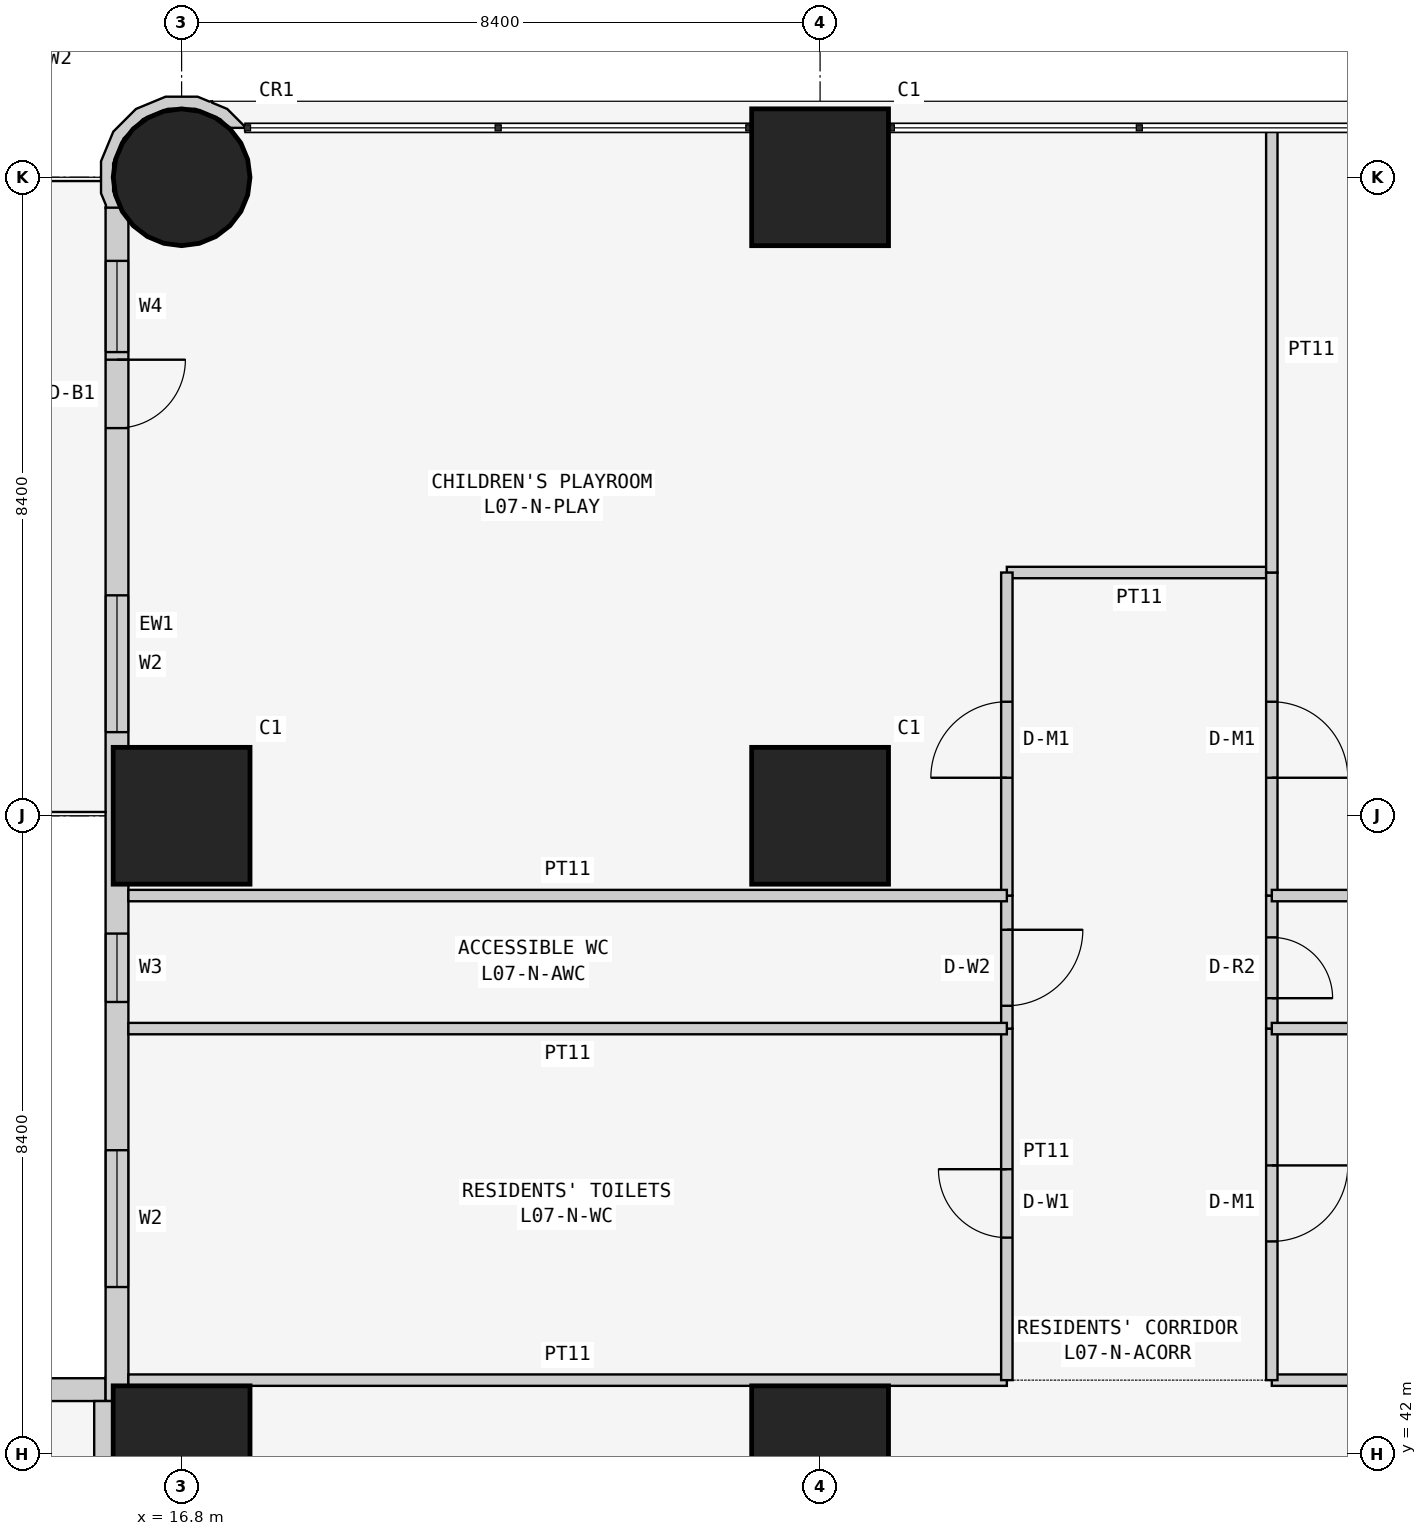
"""IFC4 building model, lengths in metres.
Left out: names, types, materials, properties, quantities, classifications, styles, units other than length and angle.
Written with IfcOpenShell. Run it as: python <this file> out.ifc"""

import sys

from ifc_helpers import new_model, si_unit, direction, frame, frame_2d, origin, origin_2d, place, context, subcontext, project, spatial, polyline, rectangle, circle, outline, extrude, element, fill, save


model = new_model("IFC4")
c1 = context("Model", 3, precision=1e-05, world=origin(), true_north=direction((0.0, 1.0)))
c2 = subcontext(c1, "Body", "Model", "MODEL_VIEW")
j1 = project(units=[si_unit("LENGTHUNIT", "METRE"), si_unit("PLANEANGLEUNIT", "RADIAN")], contexts=[c1])
p1 = place(None, origin())
s1 = spatial("IfcSite", under=j1, at=p1, CompositionType="ELEMENT")
p2 = place(p1, origin())
s2 = spatial("IfcBuilding", under=s1, at=p2, CompositionType="ELEMENT")
p3 = place(p2, frame((0.0, 0.0, 34.5)))
s3 = spatial("IfcBuildingStorey", under=s2, at=p3, CompositionType="ELEMENT", Elevation=34.5)
for number, where, z_axis, x_axis in (
    (1, (16.8, 42.0, 0.0), (0.0, 0.0, 1.0), (1.0, 0.0, 0.0)),
    (2, (16.8, 50.4, 0.0), (0.0, 0.0, 1.0), (1.0, 0.0, 0.0)),
):
    element("IfcColumn", number, at=place(p3, frame(where, z_axis=z_axis, x_axis=x_axis)), inside=s3, PredefinedType="COLUMN", context=c2, shape_type="SweptSolid", body=[
        extrude(rectangle(XDim=1.8, YDim=1.8, at=origin_2d()), origin(), (0.0, 0.0, 1.0), 3.6),
    ])
p4 = place(p3, frame((16.8, 58.8, 0.0), z_axis=(0.0, 0.0, 1.0), x_axis=(1.0, 0.0, 0.0)))
e3 = element("IfcColumn", 3, at=p4, inside=s3, PredefinedType="COLUMN", context=c2, shape_type="SweptSolid", body=[
    extrude(circle(Radius=0.9, at=origin_2d()), origin(), (0.0, 0.0, 1.0), 3.6),
])
for number, where, z_axis, x_axis in (
    (4, (25.2, 42.0, 0.0), (0.0, 0.0, 1.0), (1.0, 0.0, 0.0)),
    (5, (25.2, 50.4, 0.0), (0.0, 0.0, 1.0), (1.0, 0.0, 0.0)),
    (6, (25.2, 58.8, 0.0), (0.0, 0.0, 1.0), (1.0, 0.0, 0.0)),
):
    element("IfcColumn", number, at=place(p3, frame(where, z_axis=z_axis, x_axis=x_axis)), inside=s3, PredefinedType="COLUMN", context=c2, shape_type="SweptSolid", body=[
        extrude(rectangle(XDim=1.8, YDim=1.8, at=origin_2d()), origin(), (0.0, 0.0, 1.0), 3.6),
    ])
p5 = place(p3, frame((15.8, 42.85, 0.0), z_axis=(0.0, 0.0, 1.0), x_axis=(-1.0, 0.0, 0.0)))
e7 = element("IfcWall", 7, at=p5, inside=s3, PredefinedType="SOLIDWALL", context=c2, shape_type="SweptSolid", body=[
    extrude(rectangle(XDim=15.4, YDim=0.3, at=frame_2d((7.7, 0.0))), origin(), (0.0, 0.0, 1.0), 3.45),
])
p6 = place(p5, frame((1.2, 0.0, 0.9)))
e8 = element("IfcOpeningElement", 8, at=p6, cuts=e7, PredefinedType="OPENING", context=c2, shape_type="SweptSolid", body=[
    extrude(rectangle(XDim=1.8, YDim=1.5, at=frame_2d((0.9, 0.75))), frame((0.0, 0.16, 0.0), z_axis=(0.0, -1.0, 0.0), x_axis=(1.0, 0.0, 0.0)), (0.0, 0.0, 1.0), 0.32),
])
p7 = place(p5, frame((4.95, 0.0, 1.5)))
e9 = element("IfcOpeningElement", 9, at=p7, cuts=e7, PredefinedType="OPENING", context=c2, shape_type="SweptSolid", body=[
    extrude(rectangle(XDim=0.9, YDim=0.7, at=frame_2d((0.45, 0.35))), frame((0.0, 0.16, 0.0), z_axis=(0.0, -1.0, 0.0), x_axis=(1.0, 0.0, 0.0)), (0.0, 0.0, 1.0), 0.32),
])
p8 = place(p5, frame((8.5, 0.0, 0.9)))
e10 = element("IfcOpeningElement", 10, at=p8, cuts=e7, PredefinedType="OPENING", context=c2, shape_type="SweptSolid", body=[
    extrude(rectangle(XDim=1.8, YDim=1.5, at=frame_2d((0.9, 0.75))), frame((0.0, 0.16, 0.0), z_axis=(0.0, -1.0, 0.0), x_axis=(1.0, 0.0, 0.0)), (0.0, 0.0, 1.0), 0.32),
])
p9 = place(p5, frame((12.5, 0.0, 0.0)))
e11 = element("IfcOpeningElement", 11, at=p9, cuts=e7, PredefinedType="OPENING", context=c2, shape_type="SweptSolid", body=[
    extrude(rectangle(XDim=0.9, YDim=2.4, at=frame_2d((0.45, 1.2))), frame((0.0, 0.16, 0.0), z_axis=(0.0, -1.0, 0.0), x_axis=(1.0, 0.0, 0.0)), (0.0, 0.0, 1.0), 0.32),
])
p10 = place(p5, frame((13.5, 0.0, 0.9)))
e12 = element("IfcOpeningElement", 12, at=p10, cuts=e7, PredefinedType="OPENING", context=c2, shape_type="SweptSolid", body=[
    extrude(rectangle(XDim=1.2, YDim=1.5, at=frame_2d((0.6, 0.75))), frame((0.0, 0.16, 0.0), z_axis=(0.0, -1.0, 0.0), x_axis=(1.0, 0.0, 0.0)), (0.0, 0.0, 1.0), 0.32),
])
p11 = place(p3, frame((15.95, 58.4, 0.0), z_axis=(0.0, 0.0, 1.0), x_axis=(0.0, -1.0, 0.0)))
e13 = element("IfcWall", 13, at=p11, inside=s3, PredefinedType="SOLIDWALL", context=c2, shape_type="SweptSolid", body=[
    extrude(rectangle(XDim=15.7, YDim=0.3, at=frame_2d((7.85, 0.0))), origin(), (0.0, 0.0, 1.0), 3.45),
])
p12 = place(p11, frame((12.4, 0.0, 0.9)))
e14 = element("IfcOpeningElement", 14, at=p12, cuts=e13, PredefinedType="OPENING", context=c2, shape_type="SweptSolid", body=[
    extrude(rectangle(XDim=1.8, YDim=1.5, at=frame_2d((0.9, 0.75))), frame((0.0, 0.16, 0.0), z_axis=(0.0, -1.0, 0.0), x_axis=(1.0, 0.0, 0.0)), (0.0, 0.0, 1.0), 0.32),
])
p13 = place(p11, frame((9.55, 0.0, 1.5)))
e15 = element("IfcOpeningElement", 15, at=p13, cuts=e13, PredefinedType="OPENING", context=c2, shape_type="SweptSolid", body=[
    extrude(rectangle(XDim=0.9, YDim=0.7, at=frame_2d((0.45, 0.35))), frame((0.0, 0.16, 0.0), z_axis=(0.0, -1.0, 0.0), x_axis=(1.0, 0.0, 0.0)), (0.0, 0.0, 1.0), 0.32),
])
p14 = place(p11, frame((5.1, 0.0, 0.9)))
e16 = element("IfcOpeningElement", 16, at=p14, cuts=e13, PredefinedType="OPENING", context=c2, shape_type="SweptSolid", body=[
    extrude(rectangle(XDim=1.8, YDim=1.5, at=frame_2d((0.9, 0.75))), frame((0.0, 0.16, 0.0), z_axis=(0.0, -1.0, 0.0), x_axis=(1.0, 0.0, 0.0)), (0.0, 0.0, 1.0), 0.32),
])
p15 = place(p11, frame((2.0, 0.0, 0.0)))
e17 = element("IfcOpeningElement", 17, at=p15, cuts=e13, PredefinedType="OPENING", context=c2, shape_type="SweptSolid", body=[
    extrude(rectangle(XDim=0.9, YDim=2.4, at=frame_2d((0.45, 1.2))), frame((0.0, 0.16, 0.0), z_axis=(0.0, -1.0, 0.0), x_axis=(1.0, 0.0, 0.0)), (0.0, 0.0, 1.0), 0.32),
])
p16 = place(p11, frame((0.7, 0.0, 0.9)))
e18 = element("IfcOpeningElement", 18, at=p16, cuts=e13, PredefinedType="OPENING", context=c2, shape_type="SweptSolid", body=[
    extrude(rectangle(XDim=1.2, YDim=1.5, at=frame_2d((0.6, 0.75))), frame((0.0, 0.16, 0.0), z_axis=(0.0, -1.0, 0.0), x_axis=(1.0, 0.0, 0.0)), (0.0, 0.0, 1.0), 0.32),
])
p17 = place(p3, frame((17.567, 59.411, 0.0), z_axis=(0.0, 0.0, 1.0), x_axis=(-0.377204953059, 0.926129809145, 0.0)))
e19 = element("IfcWall", 19, at=p17, inside=s3, PredefinedType="SOLIDWALL", context=c2, shape_type="SweptSolid", body=[
    extrude(outline(polyline([(-0.27, 2.017), (-0.37, 1.841), (-0.102, 1.842), (0.23, 1.707), (0.484, 1.455), (0.624, 1.125), (0.626, 0.766), (0.491, 0.434), (0.239, 0.18), (0.09, 0.117), (0.011, -0.078), (0.024, -0.083), (0.329, 0.045), (0.48, 0.198), (0.499, 0.193), (0.508, 0.225), (0.626, 0.345), (0.785, 0.736), (0.782, 1.157), (0.619, 1.546), (0.319, 1.842), (-0.072, 2.002), (-0.24, 2.0), (-0.27, 2.017)])), origin(), (0.0, 0.0, 1.0), 3.45),
])
for number, where, z_axis, x_axis in (
    (20, (16.1, 42.975, 0.0), (0.0, 0.0, 1.0), (1.0, 0.0, 0.0)),
    (21, (31.143, 42.975, 0.0), (0.0, 0.0, 1.0), (1.0, 0.0, 0.0)),
):
    element("IfcWall", number, at=place(p3, frame(where, z_axis=z_axis, x_axis=x_axis)), inside=s3, PredefinedType="PARTITIONING", context=c2, shape_type="SweptSolid", body=[
        extrude(rectangle(XDim=11.557, YDim=0.15, at=frame_2d((5.778, 0.0))), origin(), (0.0, 0.0, 1.0), 3.45),
    ])
p18 = place(p3, frame((15.775, 36.229, 0.0), z_axis=(0.0, 0.0, 1.0), x_axis=(0.0, 1.0, 0.0)))
e22 = element("IfcWall", 22, at=p18, inside=s3, PredefinedType="PARTITIONING", context=c2, shape_type="SweptSolid", body=[
    extrude(rectangle(XDim=6.471, YDim=0.25, at=frame_2d((3.235, 0.0))), origin(), (0.0, 0.0, 1.0), 3.45),
])
p19 = place(p3, frame((27.657, 47.6, 0.0), z_axis=(0.0, 0.0, 1.0), x_axis=(0.0, -1.0, 0.0)))
e23 = element("IfcWall", 23, at=p19, inside=s3, PredefinedType="PARTITIONING", context=c2, shape_type="SweptSolid", body=[
    extrude(rectangle(XDim=4.625, YDim=0.15, at=frame_2d((2.312, 0.0))), origin(), (0.0, 0.0, 1.0), 3.45),
])
p20 = place(p19, frame((1.85, 0.0, 0.0)))
e24 = element("IfcOpeningElement", 24, at=p20, cuts=e23, PredefinedType="OPENING", context=c2, shape_type="SweptSolid", body=[
    extrude(rectangle(XDim=0.9, YDim=2.1, at=frame_2d((0.45, 1.05))), frame((0.0, 0.085, 0.0), z_axis=(0.0, -1.0, 0.0), x_axis=(1.0, 0.0, 0.0)), (0.0, 0.0, 1.0), 0.17),
])
p21 = place(p3, frame((27.657, 49.35, 0.0), z_axis=(0.0, 0.0, 1.0), x_axis=(0.0, -1.0, 0.0)))
e25 = element("IfcWall", 25, at=p21, inside=s3, PredefinedType="PARTITIONING", context=c2, shape_type="SweptSolid", body=[
    extrude(rectangle(XDim=1.75, YDim=0.15, at=frame_2d((0.875, 0.0))), origin(), (0.0, 0.0, 1.0), 3.45),
])
p22 = place(p21, frame((0.45, 0.0, 0.0)))
e26 = element("IfcOpeningElement", 26, at=p22, cuts=e25, PredefinedType="OPENING", context=c2, shape_type="SweptSolid", body=[
    extrude(rectangle(XDim=1.0, YDim=2.1, at=frame_2d((0.5, 1.05))), frame((0.0, 0.085, 0.0), z_axis=(0.0, -1.0, 0.0), x_axis=(1.0, 0.0, 0.0)), (0.0, 0.0, 1.0), 0.17),
])
p23 = place(p3, frame((31.143, 53.6, 0.0), z_axis=(0.0, 0.0, 1.0), x_axis=(-1.0, 0.0, 0.0)))
e27 = element("IfcWall", 27, at=p23, inside=s3, PredefinedType="PARTITIONING", context=c2, shape_type="SweptSolid", body=[
    extrude(rectangle(XDim=3.486, YDim=0.15, at=frame_2d((1.743, 0.0))), origin(), (0.0, 0.0, 1.0), 3.45),
])
p24 = place(p3, frame((27.657, 53.6, 0.0), z_axis=(0.0, 0.0, 1.0), x_axis=(0.0, -1.0, 0.0)))
e28 = element("IfcWall", 28, at=p24, inside=s3, PredefinedType="PARTITIONING", context=c2, shape_type="SweptSolid", body=[
    extrude(rectangle(XDim=4.25, YDim=0.15, at=frame_2d((2.125, 0.0))), origin(), (0.0, 0.0, 1.0), 3.45),
])
p25 = place(p24, frame((1.7, 0.0, 0.0)))
e29 = element("IfcOpeningElement", 29, at=p25, cuts=e28, PredefinedType="OPENING", context=c2, shape_type="SweptSolid", body=[
    extrude(rectangle(XDim=1.0, YDim=2.1, at=frame_2d((0.5, 1.05))), frame((0.0, 0.085, 0.0), z_axis=(0.0, -1.0, 0.0), x_axis=(1.0, 0.0, 0.0)), (0.0, 0.0, 1.0), 0.17),
])
p26 = place(p3, frame((31.143, 42.975, 0.0), z_axis=(0.0, 0.0, 1.0), x_axis=(0.0, 1.0, 0.0)))
e30 = element("IfcWall", 30, at=p26, inside=s3, PredefinedType="PARTITIONING", context=c2, shape_type="SweptSolid", body=[
    extrude(rectangle(XDim=4.625, YDim=0.15, at=frame_2d((2.312, 0.0))), origin(), (0.0, 0.0, 1.0), 3.45),
])
p27 = place(p26, frame((1.825, 0.0, 0.0)))
e31 = element("IfcOpeningElement", 31, at=p27, cuts=e30, PredefinedType="OPENING", context=c2, shape_type="SweptSolid", body=[
    extrude(rectangle(XDim=1.0, YDim=2.1, at=frame_2d((0.5, 1.05))), frame((0.0, 0.085, 0.0), z_axis=(0.0, -1.0, 0.0), x_axis=(1.0, 0.0, 0.0)), (0.0, 0.0, 1.0), 0.17),
])
p28 = place(p3, frame((31.143, 47.6, 0.0), z_axis=(0.0, 0.0, 1.0), x_axis=(0.0, 1.0, 0.0)))
e32 = element("IfcWall", 32, at=p28, inside=s3, PredefinedType="PARTITIONING", context=c2, shape_type="SweptSolid", body=[
    extrude(rectangle(XDim=1.75, YDim=0.15, at=frame_2d((0.875, 0.0))), origin(), (0.0, 0.0, 1.0), 3.45),
])
p29 = place(p28, frame((0.4, 0.0, 0.0)))
e33 = element("IfcOpeningElement", 33, at=p29, cuts=e32, PredefinedType="OPENING", context=c2, shape_type="SweptSolid", body=[
    extrude(rectangle(XDim=0.8, YDim=2.1, at=frame_2d((0.4, 1.05))), frame((0.0, 0.085, 0.0), z_axis=(0.0, -1.0, 0.0), x_axis=(1.0, 0.0, 0.0)), (0.0, 0.0, 1.0), 0.17),
])
p30 = place(p3, frame((31.143, 49.35, 0.0), z_axis=(0.0, 0.0, 1.0), x_axis=(0.0, 1.0, 0.0)))
e34 = element("IfcWall", 34, at=p30, inside=s3, PredefinedType="PARTITIONING", context=c2, shape_type="SweptSolid", body=[
    extrude(rectangle(XDim=4.25, YDim=0.15, at=frame_2d((2.125, 0.0))), origin(), (0.0, 0.0, 1.0), 3.45),
])
p31 = place(p30, frame((1.55, 0.0, 0.0)))
e35 = element("IfcOpeningElement", 35, at=p31, cuts=e34, PredefinedType="OPENING", context=c2, shape_type="SweptSolid", body=[
    extrude(rectangle(XDim=1.0, YDim=2.1, at=frame_2d((0.5, 1.05))), frame((0.0, 0.085, 0.0), z_axis=(0.0, -1.0, 0.0), x_axis=(1.0, 0.0, 0.0)), (0.0, 0.0, 1.0), 0.17),
])
for number, where, z_axis, x_axis in (
    (36, (27.657, 47.6, 0.0), (0.0, 0.0, 1.0), (-1.0, 0.0, 0.0)),
    (37, (27.657, 49.35, 0.0), (0.0, 0.0, 1.0), (-1.0, 0.0, 0.0)),
):
    element("IfcWall", number, at=place(p3, frame(where, z_axis=z_axis, x_axis=x_axis)), inside=s3, PredefinedType="PARTITIONING", context=c2, shape_type="SweptSolid", body=[
        extrude(rectangle(XDim=11.557, YDim=0.15, at=frame_2d((5.778, 0.0))), origin(), (0.0, 0.0, 1.0), 3.45),
    ])
p32 = place(p3, frame((31.143, 59.45, 0.0), z_axis=(0.0, 0.0, 1.0), x_axis=(0.0, -1.0, 0.0)))
e38 = element("IfcWall", 38, at=p32, inside=s3, PredefinedType="PARTITIONING", context=c2, shape_type="SweptSolid", body=[
    extrude(rectangle(XDim=5.85, YDim=0.15, at=frame_2d((2.925, 0.0))), origin(), (0.0, 0.0, 1.0), 3.45),
])
for number, where, z_axis, x_axis in (
    (39, (42.7, 47.6, 0.0), (0.0, 0.0, 1.0), (-1.0, 0.0, 0.0)),
    (40, (42.7, 49.35, 0.0), (0.0, 0.0, 1.0), (-1.0, 0.0, 0.0)),
):
    element("IfcWall", number, at=place(p3, frame(where, z_axis=z_axis, x_axis=x_axis)), inside=s3, PredefinedType="PARTITIONING", context=c2, shape_type="SweptSolid", body=[
        extrude(rectangle(XDim=11.557, YDim=0.15, at=frame_2d((5.778, 0.0))), origin(), (0.0, 0.0, 1.0), 3.45),
    ])
p33 = place(p12, origin())
e41 = element("IfcWindow", 41, at=p33, inside=s3, PartitioningType="SINGLE_PANEL", PredefinedType="WINDOW", context=c2, shape_type="SweptSolid", body=[
    extrude(rectangle(XDim=1.8, YDim=1.5, at=frame_2d((0.9, 0.75))), frame((0.0, 0.03, 0.0), z_axis=(0.0, -1.0, 0.0), x_axis=(1.0, 0.0, 0.0)), (0.0, 0.0, 1.0), 0.06),
])
fill(e14, e41)
p34 = place(p13, origin())
e42 = element("IfcWindow", 42, at=p34, inside=s3, PartitioningType="SINGLE_PANEL", PredefinedType="WINDOW", context=c2, shape_type="SweptSolid", body=[
    extrude(rectangle(XDim=0.9, YDim=0.7, at=frame_2d((0.45, 0.35))), frame((0.0, 0.03, 0.0), z_axis=(0.0, -1.0, 0.0), x_axis=(1.0, 0.0, 0.0)), (0.0, 0.0, 1.0), 0.06),
])
fill(e15, e42)
p35 = place(p14, origin())
e43 = element("IfcWindow", 43, at=p35, inside=s3, PartitioningType="SINGLE_PANEL", PredefinedType="WINDOW", context=c2, shape_type="SweptSolid", body=[
    extrude(rectangle(XDim=1.8, YDim=1.5, at=frame_2d((0.9, 0.75))), frame((0.0, 0.03, 0.0), z_axis=(0.0, -1.0, 0.0), x_axis=(1.0, 0.0, 0.0)), (0.0, 0.0, 1.0), 0.06),
])
fill(e16, e43)
p36 = place(p15, origin())
e44 = element("IfcDoor", 44, at=p36, inside=s3, OperationType="SINGLE_SWING_LEFT", PredefinedType="DOOR", context=c2, shape_type="SweptSolid", body=[
    extrude(rectangle(XDim=0.9, YDim=2.4, at=frame_2d((0.45, 1.2))), frame((0.0, 0.025, 0.0), z_axis=(0.0, -1.0, 0.0), x_axis=(1.0, 0.0, 0.0)), (0.0, 0.0, 1.0), 0.05),
])
fill(e17, e44)
p37 = place(p16, origin())
e45 = element("IfcWindow", 45, at=p37, inside=s3, PartitioningType="SINGLE_PANEL", PredefinedType="WINDOW", context=c2, shape_type="SweptSolid", body=[
    extrude(rectangle(XDim=1.2, YDim=1.5, at=frame_2d((0.6, 0.75))), frame((0.0, 0.03, 0.0), z_axis=(0.0, -1.0, 0.0), x_axis=(1.0, 0.0, 0.0)), (0.0, 0.0, 1.0), 0.06),
])
fill(e18, e45)
p38 = place(p20, frame((0.9, 0.0, 0.0), z_axis=(0.0, 0.0, 1.0), x_axis=(-1.0, 0.0, 0.0)))
e46 = element("IfcDoor", 46, at=p38, inside=s3, OperationType="SINGLE_SWING_RIGHT", PredefinedType="DOOR", context=c2, shape_type="SweptSolid", body=[
    extrude(rectangle(XDim=0.9, YDim=2.1, at=frame_2d((0.45, 1.05))), frame((0.0, 0.025, 0.0), z_axis=(0.0, -1.0, 0.0), x_axis=(1.0, 0.0, 0.0)), (0.0, 0.0, 1.0), 0.05),
])
fill(e24, e46)
p39 = place(p22, origin())
e47 = element("IfcDoor", 47, at=p39, inside=s3, OperationType="SINGLE_SWING_LEFT", PredefinedType="DOOR", context=c2, shape_type="SweptSolid", body=[
    extrude(rectangle(XDim=1.0, YDim=2.1, at=frame_2d((0.5, 1.05))), frame((0.0, 0.025, 0.0), z_axis=(0.0, -1.0, 0.0), x_axis=(1.0, 0.0, 0.0)), (0.0, 0.0, 1.0), 0.05),
])
fill(e26, e47)
p40 = place(p25, frame((1.0, 0.0, 0.0), z_axis=(0.0, 0.0, 1.0), x_axis=(-1.0, 0.0, 0.0)))
e48 = element("IfcDoor", 48, at=p40, inside=s3, OperationType="SINGLE_SWING_LEFT", PredefinedType="DOOR", context=c2, shape_type="SweptSolid", body=[
    extrude(rectangle(XDim=1.0, YDim=2.1, at=frame_2d((0.5, 1.05))), frame((0.0, 0.025, 0.0), z_axis=(0.0, -1.0, 0.0), x_axis=(1.0, 0.0, 0.0)), (0.0, 0.0, 1.0), 0.05),
])
fill(e29, e48)
p41 = place(p27, frame((1.0, 0.0, 0.0), z_axis=(0.0, 0.0, 1.0), x_axis=(-1.0, 0.0, 0.0)))
e49 = element("IfcDoor", 49, at=p41, inside=s3, OperationType="SINGLE_SWING_LEFT", PredefinedType="DOOR", context=c2, shape_type="SweptSolid", body=[
    extrude(rectangle(XDim=1.0, YDim=2.1, at=frame_2d((0.5, 1.05))), frame((0.0, 0.025, 0.0), z_axis=(0.0, -1.0, 0.0), x_axis=(1.0, 0.0, 0.0)), (0.0, 0.0, 1.0), 0.05),
])
fill(e31, e49)
p42 = place(p29, frame((0.8, 0.0, 0.0), z_axis=(0.0, 0.0, 1.0), x_axis=(-1.0, 0.0, 0.0)))
e50 = element("IfcDoor", 50, at=p42, inside=s3, OperationType="SINGLE_SWING_RIGHT", PredefinedType="DOOR", context=c2, shape_type="SweptSolid", body=[
    extrude(rectangle(XDim=0.8, YDim=2.1, at=frame_2d((0.4, 1.05))), frame((0.0, 0.025, 0.0), z_axis=(0.0, -1.0, 0.0), x_axis=(1.0, 0.0, 0.0)), (0.0, 0.0, 1.0), 0.05),
])
fill(e33, e50)
p43 = place(p31, frame((1.0, 0.0, 0.0), z_axis=(0.0, 0.0, 1.0), x_axis=(-1.0, 0.0, 0.0)))
e51 = element("IfcDoor", 51, at=p43, inside=s3, OperationType="SINGLE_SWING_RIGHT", PredefinedType="DOOR", context=c2, shape_type="SweptSolid", body=[
    extrude(rectangle(XDim=1.0, YDim=2.1, at=frame_2d((0.5, 1.05))), frame((0.0, 0.025, 0.0), z_axis=(0.0, -1.0, 0.0), x_axis=(1.0, 0.0, 0.0)), (0.0, 0.0, 1.0), 0.05),
])
fill(e35, e51)
save(model, sys.argv[1])
